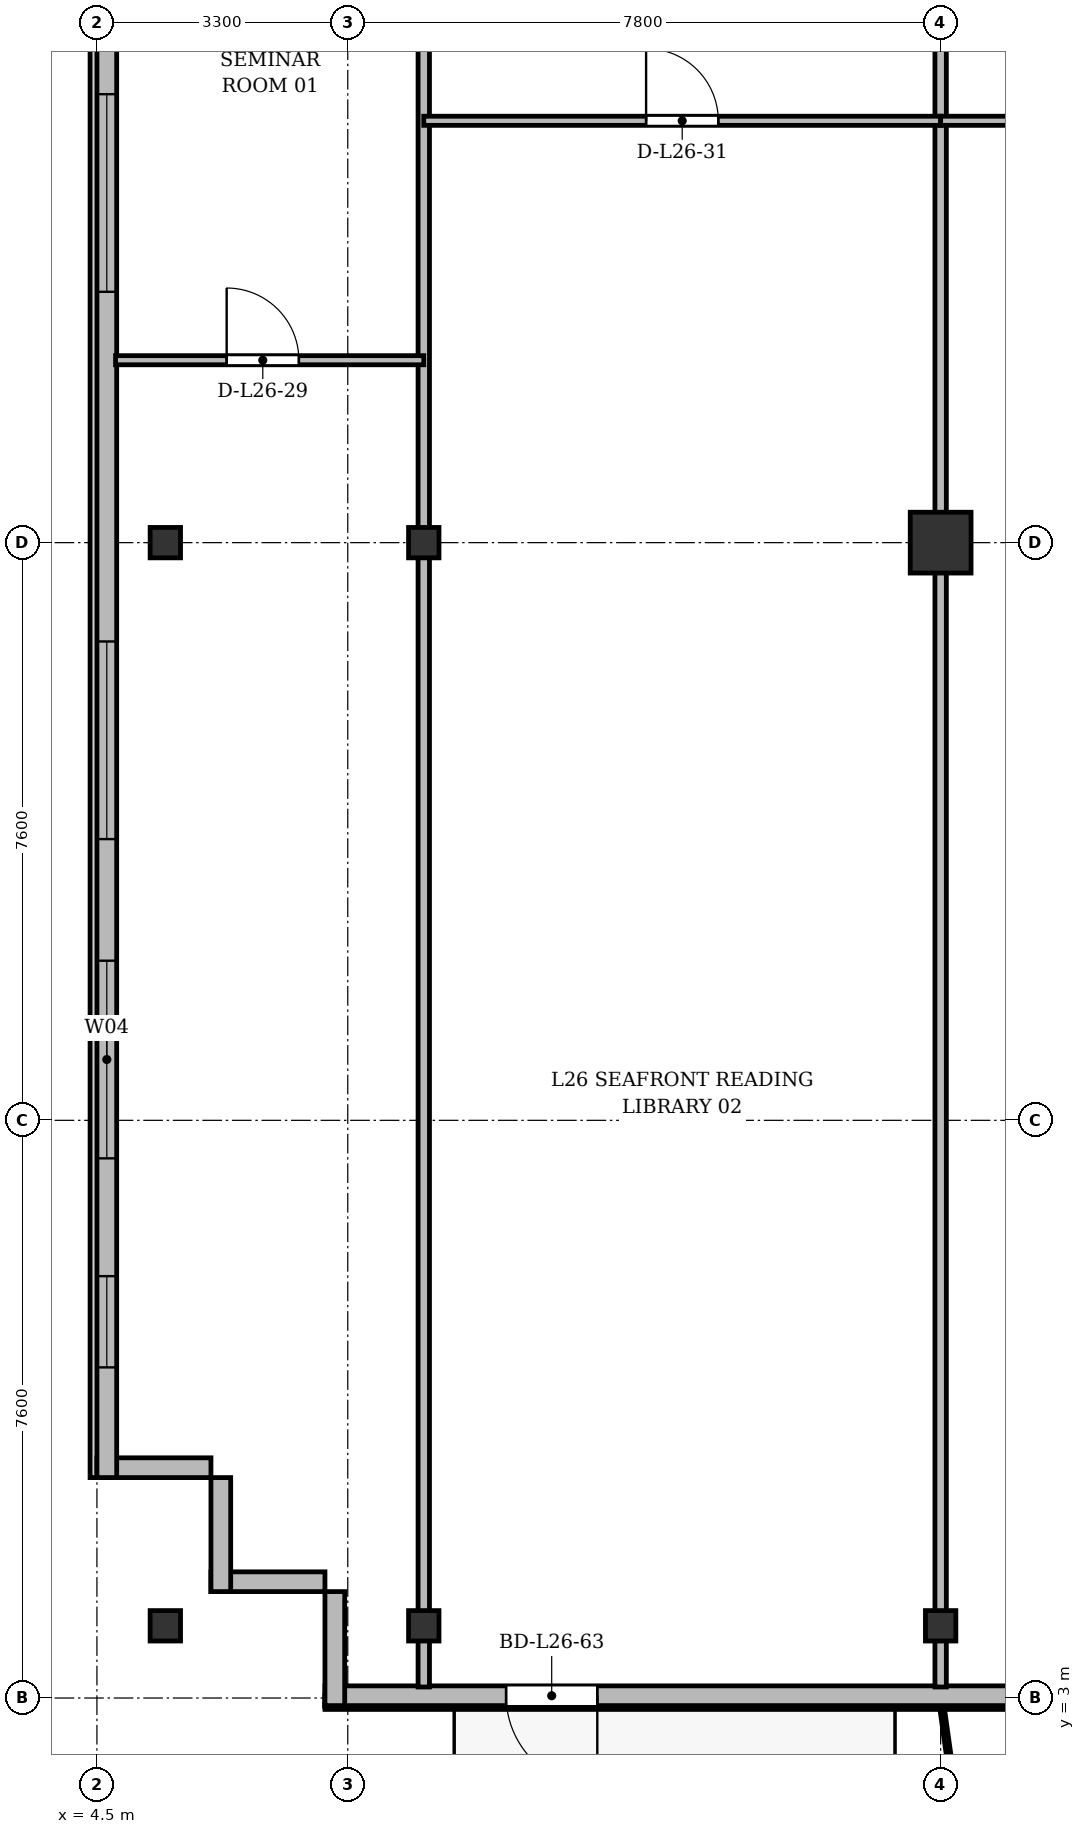
"""IFC4 building model, lengths in metres.
Left out: names, types, materials, properties, quantities, classifications, styles, units other than length and angle.
Written with IfcOpenShell. Run it as: python <this file> out.ifc"""

import sys

from ifc_helpers import new_model, si_unit, direction, frame, frame_2d, origin, origin_2d, place, context, subcontext, project, spatial, rectangle, i_section, extrude, source, transform, mapped, element, fill, save


model = new_model("IFC4")
c1 = context("Model", 3, precision=1e-05, world=origin(), true_north=direction((0.0, 1.0)))
c2 = subcontext(c1, "Body", "Model", "MODEL_VIEW")
j1 = project(units=[si_unit("LENGTHUNIT", "METRE"), si_unit("PLANEANGLEUNIT", "RADIAN")], contexts=[c1])
p1 = place(None, origin())
s1 = spatial("IfcSite", under=j1, at=p1, CompositionType="ELEMENT")
p2 = place(p1, origin())
s2 = spatial("IfcBuilding", under=s1, at=p2, CompositionType="ELEMENT")
p3 = place(p2, frame((0.0, 0.0, 103.3)))
s3 = spatial("IfcBuildingStorey", under=s2, at=p3, CompositionType="ELEMENT", Elevation=103.3)
m1 = source(origin(), c2, "Body", "SweptSolid", [
    extrude(i_section(OverallWidth=0.4, OverallDepth=0.4, WebThickness=0.022, FlangeThickness=0.035, at=origin_2d()), origin(), (0.0, 0.0, 1.0), 3.6),
])
for number, where, z_axis, x_axis in (
    (1, (5.4, 3.95, 0.0), (0.0, 0.0, 1.0), (1.0, 0.0, 0.0)),
    (2, (5.4, 18.2, 0.0), (0.0, 0.0, 1.0), (1.0, 0.0, 0.0)),
    (3, (8.8, 3.95, 0.0), (0.0, 0.0, 1.0), (1.0, 0.0, 0.0)),
    (4, (8.8, 18.2, 0.0), (0.0, 0.0, 1.0), (1.0, 0.0, 0.0)),
    (5, (15.6, 3.95, 0.0), (0.0, 0.0, 1.0), (1.0, 0.0, 0.0)),
):
    element("IfcColumn", number, at=place(p3, frame(where, z_axis=z_axis, x_axis=x_axis)), inside=s3, PredefinedType="COLUMN", context=c2, shape_type="MappedRepresentation", body=[
        mapped(m1, transform((0.0, 0.0, 0.0), x_axis=(1.0, 0.0, 0.0), y_axis=(0.0, 1.0, 0.0), z_axis=(0.0, 0.0, 1.0), scale=1.0)),
    ])
m2 = source(origin(), c2, "Body", "SweptSolid", [
    extrude(rectangle(XDim=0.8, YDim=0.8, at=origin_2d()), origin(), (0.0, 0.0, 1.0), 3.6),
])
p4 = place(p3, frame((15.6, 18.2, 0.0), z_axis=(0.0, 0.0, 1.0), x_axis=(1.0, 0.0, 0.0)))
e6 = element("IfcColumn", 6, at=p4, inside=s3, PredefinedType="COLUMN", context=c2, shape_type="MappedRepresentation", body=[
    mapped(m2, transform((0.0, 0.0, 0.0), x_axis=(1.0, 0.0, 0.0), y_axis=(0.0, 1.0, 0.0), z_axis=(0.0, 0.0, 1.0), scale=1.0)),
])
for number, where, z_axis, x_axis in (
    (7, (7.5, 4.53, 0.0), (0.0, 0.0, 1.0), (-1.0, 0.0, 0.0)),
    (8, (6.13, 4.4, 0.0), (0.0, 0.0, 1.0), (0.0, 1.0, 0.0)),
):
    element("IfcWall", number, at=place(p3, frame(where, z_axis=z_axis, x_axis=x_axis)), inside=s3, PredefinedType="SOLIDWALL", context=c2, shape_type="SweptSolid", body=[
        extrude(rectangle(XDim=1.5, YDim=0.26, at=frame_2d((0.75, 0.0))), origin(), (0.0, 0.0, 1.0), 3.34),
    ])
p5 = place(p3, frame((6.0, 6.03, 0.0), z_axis=(0.0, 0.0, 1.0), x_axis=(-1.0, 0.0, 0.0)))
e9 = element("IfcWall", 9, at=p5, inside=s3, PredefinedType="SOLIDWALL", context=c2, shape_type="SweptSolid", body=[
    extrude(rectangle(XDim=1.5, YDim=0.26, at=frame_2d((0.75, 0.0))), origin(), (0.0, 0.0, 1.0), 2.84),
])
p6 = place(p3, frame((4.63, 5.9, 0.0), z_axis=(0.0, 0.0, 1.0), x_axis=(0.0, 1.0, 0.0)))
e10 = element("IfcWall", 10, at=p6, inside=s3, PredefinedType="SOLIDWALL", context=c2, shape_type="SweptSolid", body=[
    extrude(rectangle(XDim=39.6, YDim=0.26, at=frame_2d((19.8, 0.0))), origin(), (0.0, 0.0, 1.0), 3.34),
])
p7 = place(p6, frame((1.45, 0.0, 0.92)))
e11 = element("IfcOpeningElement", 11, at=p7, cuts=e10, PredefinedType="OPENING", context=c2, shape_type="SweptSolid", body=[
    extrude(rectangle(XDim=1.2, YDim=1.65, at=frame_2d((0.6, 0.825))), frame((0.0, 0.14, 0.0), z_axis=(0.0, -1.0, 0.0), x_axis=(1.0, 0.0, 0.0)), (0.0, 0.0, 1.0), 0.28),
])
p8 = place(p6, frame((4.2, 0.0, 0.92)))
e12 = element("IfcOpeningElement", 12, at=p8, cuts=e10, PredefinedType="OPENING", context=c2, shape_type="SweptSolid", body=[
    extrude(rectangle(XDim=2.6, YDim=1.9, at=frame_2d((1.3, 0.95))), frame((0.0, 0.14, 0.0), z_axis=(0.0, -1.0, 0.0), x_axis=(1.0, 0.0, 0.0)), (0.0, 0.0, 1.0), 0.28),
])
p9 = place(p6, frame((8.4, 0.0, 0.92)))
e13 = element("IfcOpeningElement", 13, at=p9, cuts=e10, PredefinedType="OPENING", context=c2, shape_type="SweptSolid", body=[
    extrude(rectangle(XDim=2.6, YDim=1.9, at=frame_2d((1.3, 0.95))), frame((0.0, 0.14, 0.0), z_axis=(0.0, -1.0, 0.0), x_axis=(1.0, 0.0, 0.0)), (0.0, 0.0, 1.0), 0.28),
])
p10 = place(p6, frame((15.6, 0.0, 0.92)))
e14 = element("IfcOpeningElement", 14, at=p10, cuts=e10, PredefinedType="OPENING", context=c2, shape_type="SweptSolid", body=[
    extrude(rectangle(XDim=2.6, YDim=1.9, at=frame_2d((1.3, 0.95))), frame((0.0, 0.14, 0.0), z_axis=(0.0, -1.0, 0.0), x_axis=(1.0, 0.0, 0.0)), (0.0, 0.0, 1.0), 0.28),
])
p11 = place(p6, frame((29.6, 0.0, 0.92)))
e15 = element("IfcOpeningElement", 15, at=p11, cuts=e10, PredefinedType="OPENING", context=c2, shape_type="SweptSolid", body=[
    extrude(rectangle(XDim=2.6, YDim=1.9, at=frame_2d((1.3, 0.95))), frame((0.0, 0.14, 0.0), z_axis=(0.0, -1.0, 0.0), x_axis=(1.0, 0.0, 0.0)), (0.0, 0.0, 1.0), 0.28),
])
p12 = place(p6, frame((33.9, 0.0, 0.92)))
e16 = element("IfcOpeningElement", 16, at=p12, cuts=e10, PredefinedType="OPENING", context=c2, shape_type="SweptSolid", body=[
    extrude(rectangle(XDim=1.2, YDim=1.65, at=frame_2d((0.6, 0.825))), frame((0.0, 0.14, 0.0), z_axis=(0.0, -1.0, 0.0), x_axis=(1.0, 0.0, 0.0)), (0.0, 0.0, 1.0), 0.28),
])
p13 = place(p6, frame((37.25, 0.0, 0.92)))
e17 = element("IfcOpeningElement", 17, at=p13, cuts=e10, PredefinedType="OPENING", context=c2, shape_type="SweptSolid", body=[
    extrude(rectangle(XDim=1.2, YDim=1.65, at=frame_2d((0.6, 0.825))), frame((0.0, 0.14, 0.0), z_axis=(0.0, -1.0, 0.0), x_axis=(1.0, 0.0, 0.0)), (0.0, 0.0, 1.0), 0.28),
])
p14 = place(p3, frame((66.9, 3.03, 0.0), z_axis=(0.0, 0.0, 1.0), x_axis=(-1.0, 0.0, 0.0)))
e18 = element("IfcWall", 18, at=p14, inside=s3, PredefinedType="SOLIDWALL", context=c2, shape_type="SweptSolid", body=[
    extrude(rectangle(XDim=59.4, YDim=0.26, at=frame_2d((29.7, 0.0))), origin(), (0.0, 0.0, 1.0), 3.34),
])
p15 = place(p14, frame((2.25, 0.0, 0.9)))
e19 = element("IfcOpeningElement", 19, at=p15, cuts=e18, PredefinedType="OPENING", context=c2, shape_type="SweptSolid", body=[
    extrude(rectangle(XDim=1.5, YDim=1.75, at=frame_2d((0.75, 0.875))), frame((0.0, 0.14, 0.0), z_axis=(0.0, -1.0, 0.0), x_axis=(1.0, 0.0, 0.0)), (0.0, 0.0, 1.0), 0.28),
])
p16 = place(p14, frame((5.4, 0.0, 0.9)))
e20 = element("IfcOpeningElement", 20, at=p16, cuts=e18, PredefinedType="OPENING", context=c2, shape_type="SweptSolid", body=[
    extrude(rectangle(XDim=2.0, YDim=1.95, at=frame_2d((1.0, 0.975))), frame((0.0, 0.14, 0.0), z_axis=(0.0, -1.0, 0.0), x_axis=(1.0, 0.0, 0.0)), (0.0, 0.0, 1.0), 0.28),
])
p17 = place(p14, frame((9.213, 0.0, 0.0)))
e21 = element("IfcOpeningElement", 21, at=p17, cuts=e18, PredefinedType="OPENING", context=c2, shape_type="SweptSolid", body=[
    extrude(rectangle(XDim=1.2, YDim=2.2, at=frame_2d((0.6, 1.1))), frame((0.0, 0.14, 0.0), z_axis=(0.0, -1.0, 0.0), x_axis=(1.0, 0.0, 0.0)), (0.0, 0.0, 1.0), 0.28),
])
p18 = place(p14, frame((13.0, 0.0, 0.9)))
e22 = element("IfcOpeningElement", 22, at=p18, cuts=e18, PredefinedType="OPENING", context=c2, shape_type="SweptSolid", body=[
    extrude(rectangle(XDim=1.8, YDim=1.8, at=frame_2d((0.9, 0.9))), frame((0.0, 0.14, 0.0), z_axis=(0.0, -1.0, 0.0), x_axis=(1.0, 0.0, 0.0)), (0.0, 0.0, 1.0), 0.28),
])
p19 = place(p14, frame((16.6, 0.0, 0.9)))
e23 = element("IfcOpeningElement", 23, at=p19, cuts=e18, PredefinedType="OPENING", context=c2, shape_type="SweptSolid", body=[
    extrude(rectangle(XDim=2.2, YDim=1.8, at=frame_2d((1.1, 0.9))), frame((0.0, 0.14, 0.0), z_axis=(0.0, -1.0, 0.0), x_axis=(1.0, 0.0, 0.0)), (0.0, 0.0, 1.0), 0.28),
])
p20 = place(p14, frame((20.55, 0.0, 0.9)))
e24 = element("IfcOpeningElement", 24, at=p20, cuts=e18, PredefinedType="OPENING", context=c2, shape_type="SweptSolid", body=[
    extrude(rectangle(XDim=1.5, YDim=1.75, at=frame_2d((0.75, 0.875))), frame((0.0, 0.14, 0.0), z_axis=(0.0, -1.0, 0.0), x_axis=(1.0, 0.0, 0.0)), (0.0, 0.0, 1.0), 0.28),
])
p21 = place(p14, frame((25.4, 0.0, 0.9)))
e25 = element("IfcOpeningElement", 25, at=p21, cuts=e18, PredefinedType="OPENING", context=c2, shape_type="SweptSolid", body=[
    extrude(rectangle(XDim=2.0, YDim=1.95, at=frame_2d((1.0, 0.975))), frame((0.0, 0.14, 0.0), z_axis=(0.0, -1.0, 0.0), x_axis=(1.0, 0.0, 0.0)), (0.0, 0.0, 1.0), 0.28),
])
p22 = place(p14, frame((32.175, 0.0, 0.9)))
e26 = element("IfcOpeningElement", 26, at=p22, cuts=e18, PredefinedType="OPENING", context=c2, shape_type="SweptSolid", body=[
    extrude(rectangle(XDim=1.65, YDim=1.85, at=frame_2d((0.825, 0.925))), frame((0.0, 0.14, 0.0), z_axis=(0.0, -1.0, 0.0), x_axis=(1.0, 0.0, 0.0)), (0.0, 0.0, 1.0), 0.28),
])
p23 = place(p14, frame((37.584, 0.0, 0.0)))
e27 = element("IfcOpeningElement", 27, at=p23, cuts=e18, PredefinedType="OPENING", context=c2, shape_type="SweptSolid", body=[
    extrude(rectangle(XDim=1.2, YDim=2.2, at=frame_2d((0.6, 1.1))), frame((0.0, 0.14, 0.0), z_axis=(0.0, -1.0, 0.0), x_axis=(1.0, 0.0, 0.0)), (0.0, 0.0, 1.0), 0.28),
])
p24 = place(p14, frame((40.5, 0.0, 0.9)))
e28 = element("IfcOpeningElement", 28, at=p24, cuts=e18, PredefinedType="OPENING", context=c2, shape_type="SweptSolid", body=[
    extrude(rectangle(XDim=2.2, YDim=1.8, at=frame_2d((1.1, 0.9))), frame((0.0, 0.14, 0.0), z_axis=(0.0, -1.0, 0.0), x_axis=(1.0, 0.0, 0.0)), (0.0, 0.0, 1.0), 0.28),
])
p25 = place(p14, frame((46.65, 0.0, 0.9)))
e29 = element("IfcOpeningElement", 29, at=p25, cuts=e18, PredefinedType="OPENING", context=c2, shape_type="SweptSolid", body=[
    extrude(rectangle(XDim=1.5, YDim=1.75, at=frame_2d((0.75, 0.875))), frame((0.0, 0.14, 0.0), z_axis=(0.0, -1.0, 0.0), x_axis=(1.0, 0.0, 0.0)), (0.0, 0.0, 1.0), 0.28),
])
p26 = place(p14, frame((55.817, 0.0, 0.0)))
e30 = element("IfcOpeningElement", 30, at=p26, cuts=e18, PredefinedType="OPENING", context=c2, shape_type="SweptSolid", body=[
    extrude(rectangle(XDim=1.2, YDim=2.2, at=frame_2d((0.6, 1.1))), frame((0.0, 0.14, 0.0), z_axis=(0.0, -1.0, 0.0), x_axis=(1.0, 0.0, 0.0)), (0.0, 0.0, 1.0), 0.28),
])
p27 = place(p3, frame((7.63, 2.9, 0.0), z_axis=(0.0, 0.0, 1.0), x_axis=(0.0, 1.0, 0.0)))
e31 = element("IfcWall", 31, at=p27, inside=s3, PredefinedType="SOLIDWALL", context=c2, shape_type="SweptSolid", body=[
    extrude(rectangle(XDim=1.5, YDim=0.26, at=frame_2d((0.75, 0.0))), origin(), (0.0, 0.0, 1.0), 2.752),
])
for number, where, z_axis, x_axis in (
    (32, (8.8, 3.145, 0.0), (0.0, 0.0, 1.0), (0.0, 1.0, 0.0)),
    (33, (15.6, 3.145, 0.0), (0.0, 0.0, 1.0), (0.0, 1.0, 0.0)),
):
    element("IfcWall", number, at=place(p3, frame(where, z_axis=z_axis, x_axis=x_axis)), inside=s3, PredefinedType="PARTITIONING", context=c2, shape_type="SweptSolid", body=[
        extrude(rectangle(XDim=24.455, YDim=0.15, at=frame_2d((12.228, 0.0))), origin(), (0.0, 0.0, 1.0), 2.84),
    ])
p28 = place(p3, frame((4.745, 20.6, 0.0), z_axis=(0.0, 0.0, 1.0), x_axis=(1.0, 0.0, 0.0)))
e34 = element("IfcWall", 34, at=p28, inside=s3, PredefinedType="PARTITIONING", context=c2, shape_type="SweptSolid", body=[
    extrude(rectangle(XDim=4.055, YDim=0.12, at=frame_2d((2.027, 0.0))), origin(), (0.0, 0.0, 1.0), 2.84),
])
p29 = place(p28, frame((1.462, 0.0, 0.0)))
e35 = element("IfcOpeningElement", 35, at=p29, cuts=e34, PredefinedType="OPENING", context=c2, shape_type="SweptSolid", body=[
    extrude(rectangle(XDim=0.95, YDim=2.15, at=frame_2d((0.475, 1.075))), frame((0.0, 0.07, 0.0), z_axis=(0.0, -1.0, 0.0), x_axis=(1.0, 0.0, 0.0)), (0.0, 0.0, 1.0), 0.14),
])
p30 = place(p3, frame((8.8, 23.75, 0.0), z_axis=(0.0, 0.0, 1.0), x_axis=(1.0, 0.0, 0.0)))
e36 = element("IfcWall", 36, at=p30, inside=s3, PredefinedType="PARTITIONING", context=c2, shape_type="SweptSolid", body=[
    extrude(rectangle(XDim=6.8, YDim=0.12, at=frame_2d((3.4, 0.0))), origin(), (0.0, 0.0, 1.0), 2.84),
])
p31 = place(p30, frame((2.925, 0.0, 0.0)))
e37 = element("IfcOpeningElement", 37, at=p31, cuts=e36, PredefinedType="OPENING", context=c2, shape_type="SweptSolid", body=[
    extrude(rectangle(XDim=0.95, YDim=2.15, at=frame_2d((0.475, 1.075))), frame((0.0, 0.07, 0.0), z_axis=(0.0, -1.0, 0.0), x_axis=(1.0, 0.0, 0.0)), (0.0, 0.0, 1.0), 0.14),
])
p32 = place(p3, frame((15.6, 23.75, 0.0), z_axis=(0.0, 0.0, 1.0), x_axis=(1.0, 0.0, 0.0)))
e38 = element("IfcWall", 38, at=p32, inside=s3, PredefinedType="PARTITIONING", context=c2, shape_type="SweptSolid", body=[
    extrude(rectangle(XDim=7.8, YDim=0.12, at=frame_2d((3.9, 0.0))), origin(), (0.0, 0.0, 1.0), 2.84),
])
p33 = place(p32, frame((3.333, 0.0, 0.0)))
e39 = element("IfcOpeningElement", 39, at=p33, cuts=e38, PredefinedType="OPENING", context=c2, shape_type="SweptSolid", body=[
    extrude(rectangle(XDim=0.95, YDim=2.15, at=frame_2d((0.475, 1.075))), frame((0.0, 0.07, 0.0), z_axis=(0.0, -1.0, 0.0), x_axis=(1.0, 0.0, 0.0)), (0.0, 0.0, 1.0), 0.14),
])
m3 = source(origin(), c2, "Body", "SweptSolid", [
    extrude(rectangle(XDim=1.2, YDim=1.65, at=frame_2d((0.6, 0.825))), frame((0.0, 0.03, 0.0), z_axis=(0.0, -1.0, 0.0), x_axis=(1.0, 0.0, 0.0)), (0.0, 0.0, 1.0), 0.06),
])
p34 = place(p7, origin())
e40 = element("IfcWindow", 40, at=p34, inside=s3, PartitioningType="SINGLE_PANEL", PredefinedType="WINDOW", context=c2, shape_type="MappedRepresentation", body=[
    mapped(m3, transform((0.0, 0.0, 0.0), x_axis=(1.0, 0.0, 0.0), y_axis=(0.0, 1.0, 0.0), z_axis=(0.0, 0.0, 1.0), scale=1.0)),
])
fill(e11, e40)
m4 = source(origin(), c2, "Body", "SweptSolid", [
    extrude(rectangle(XDim=2.6, YDim=1.9, at=frame_2d((1.3, 0.95))), frame((0.0, 0.03, 0.0), z_axis=(0.0, -1.0, 0.0), x_axis=(1.0, 0.0, 0.0)), (0.0, 0.0, 1.0), 0.06),
])
p35 = place(p8, origin())
e41 = element("IfcWindow", 41, at=p35, inside=s3, PartitioningType="SINGLE_PANEL", PredefinedType="WINDOW", context=c2, shape_type="MappedRepresentation", body=[
    mapped(m4, transform((0.0, 0.0, 0.0), x_axis=(1.0, 0.0, 0.0), y_axis=(0.0, 1.0, 0.0), z_axis=(0.0, 0.0, 1.0), scale=1.0)),
])
fill(e12, e41)
p36 = place(p9, origin())
e42 = element("IfcWindow", 42, at=p36, inside=s3, PartitioningType="SINGLE_PANEL", PredefinedType="WINDOW", context=c2, shape_type="MappedRepresentation", body=[
    mapped(m4, transform((0.0, 0.0, 0.0), x_axis=(1.0, 0.0, 0.0), y_axis=(0.0, 1.0, 0.0), z_axis=(0.0, 0.0, 1.0), scale=1.0)),
])
fill(e13, e42)
p37 = place(p10, origin())
e43 = element("IfcWindow", 43, at=p37, inside=s3, PartitioningType="SINGLE_PANEL", PredefinedType="WINDOW", context=c2, shape_type="MappedRepresentation", body=[
    mapped(m4, transform((0.0, 0.0, 0.0), x_axis=(1.0, 0.0, 0.0), y_axis=(0.0, 1.0, 0.0), z_axis=(0.0, 0.0, 1.0), scale=1.0)),
])
fill(e14, e43)
m5 = source(origin(), c2, "Body", "SweptSolid", [
    extrude(rectangle(XDim=1.2, YDim=2.2, at=frame_2d((0.6, 1.1))), frame((0.0, 0.025, 0.0), z_axis=(0.0, -1.0, 0.0), x_axis=(1.0, 0.0, 0.0)), (0.0, 0.0, 1.0), 0.05),
])
p38 = place(p26, origin())
e44 = element("IfcDoor", 44, at=p38, inside=s3, OperationType="SINGLE_SWING_LEFT", PredefinedType="DOOR", context=c2, shape_type="MappedRepresentation", body=[
    mapped(m5, transform((0.0, 0.0, 0.0), x_axis=(1.0, 0.0, 0.0), y_axis=(0.0, 1.0, 0.0), z_axis=(0.0, 0.0, 1.0), scale=1.0)),
])
fill(e30, e44)
m6 = source(origin(), c2, "Body", "SweptSolid", [
    extrude(rectangle(XDim=0.95, YDim=2.15, at=frame_2d((0.475, 1.075))), frame((0.0, 0.025, 0.0), z_axis=(0.0, -1.0, 0.0), x_axis=(1.0, 0.0, 0.0)), (0.0, 0.0, 1.0), 0.05),
])
p39 = place(p29, origin())
e45 = element("IfcDoor", 45, at=p39, inside=s3, OperationType="SINGLE_SWING_LEFT", PredefinedType="DOOR", context=c2, shape_type="MappedRepresentation", body=[
    mapped(m6, transform((0.0, 0.0, 0.0), x_axis=(1.0, 0.0, 0.0), y_axis=(0.0, 1.0, 0.0), z_axis=(0.0, 0.0, 1.0), scale=1.0)),
])
fill(e35, e45)
p40 = place(p31, origin())
e46 = element("IfcDoor", 46, at=p40, inside=s3, OperationType="SINGLE_SWING_LEFT", PredefinedType="DOOR", context=c2, shape_type="MappedRepresentation", body=[
    mapped(m6, transform((0.0, 0.0, 0.0), x_axis=(1.0, 0.0, 0.0), y_axis=(0.0, 1.0, 0.0), z_axis=(0.0, 0.0, 1.0), scale=1.0)),
])
fill(e37, e46)
save(model, sys.argv[1])
